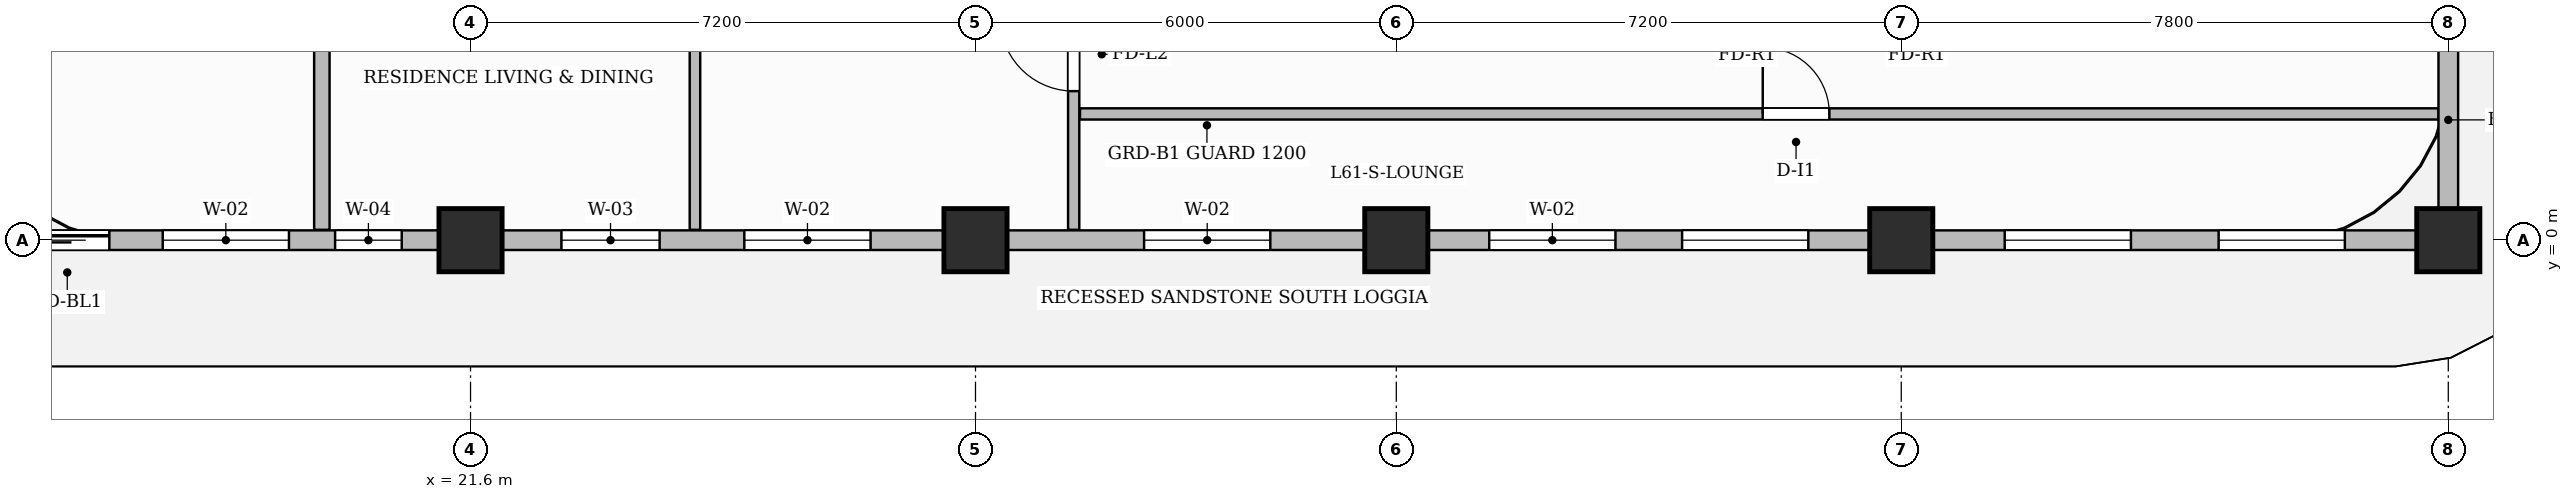
"""IFC4 building model, lengths in metres.
Left out: names, types, materials, properties, quantities, classifications, styles, units other than length and angle.
Written with IfcOpenShell. Run it as: python <this file> out.ifc"""

import sys

from ifc_helpers import new_model, si_unit, direction, frame, frame_2d, origin, origin_2d, place, context, subcontext, project, spatial, rectangle, extrude, source, transform, mapped, element, fill, save


model = new_model("IFC4")
c1 = context("Model", 3, precision=1e-05, world=origin(), true_north=direction((0.0, 1.0)))
c2 = subcontext(c1, "Body", "Model", "MODEL_VIEW")
j1 = project(units=[si_unit("LENGTHUNIT", "METRE"), si_unit("PLANEANGLEUNIT", "RADIAN")], contexts=[c1])
p1 = place(None, origin())
s1 = spatial("IfcSite", under=j1, at=p1, CompositionType="ELEMENT")
p2 = place(p1, origin())
s2 = spatial("IfcBuilding", under=s1, at=p2, CompositionType="ELEMENT")
p3 = place(p2, frame((0.0, 0.0, 244.25)))
s3 = spatial("IfcBuildingStorey", under=s2, at=p3, CompositionType="ELEMENT", Elevation=244.25)
m1 = source(origin(), c2, "Body", "SweptSolid", [
    extrude(rectangle(XDim=0.9, YDim=0.9, at=origin_2d()), origin(), (0.0, 0.0, 1.0), 3.85),
])
for number, where, z_axis, x_axis in (
    (1, (21.6, 0.0, 0.0), (0.0, 0.0, 1.0), (1.0, 0.0, 0.0)),
    (2, (28.8, 0.0, 0.0), (0.0, 0.0, 1.0), (1.0, 0.0, 0.0)),
    (3, (34.8, 0.0, 0.0), (0.0, 0.0, 1.0), (1.0, 0.0, 0.0)),
    (4, (42.0, 0.0, 0.0), (0.0, 0.0, 1.0), (1.0, 0.0, 0.0)),
    (5, (49.8, 0.0, 0.0), (0.0, 0.0, 1.0), (1.0, 0.0, 0.0)),
):
    element("IfcColumn", number, at=place(p3, frame(where, z_axis=z_axis, x_axis=x_axis)), inside=s3, PredefinedType="COLUMN", context=c2, shape_type="MappedRepresentation", body=[
        mapped(m1, transform((0.0, 0.0, 0.0), scale=1.0)),
    ])
p4 = place(p3, frame((30.2, 0.148, 0.0), z_axis=(0.0, 0.0, 1.0), x_axis=(0.0, 1.0, 0.0)))
e6 = element("IfcWall", 6, at=p4, inside=s3, PredefinedType="PARTITIONING", context=c2, shape_type="SweptSolid", body=[
    extrude(rectangle(XDim=9.312, YDim=0.16, at=frame_2d((4.656, 0.0))), origin(), (0.0, 0.0, 1.0), 3.6),
])
p5 = place(p4, frame((1.977, 0.0, 0.0)))
e7 = element("IfcOpeningElement", 7, at=p5, cuts=e6, PredefinedType="OPENING", context=c2, shape_type="SweptSolid", body=[
    extrude(rectangle(XDim=1.05, YDim=2.15, at=frame_2d((0.525, 1.075))), frame((0.0, 0.09, 0.0), z_axis=(0.0, -1.0, 0.0), x_axis=(1.0, 0.0, 0.0)), (0.0, 0.0, 1.0), 0.18),
])
p6 = place(p3, frame((30.29, 1.8, 0.0), z_axis=(0.0, 0.0, 1.0), x_axis=(1.0, 0.0, 0.0)))
e8 = element("IfcWall", 8, at=p6, inside=s3, PredefinedType="PARTITIONING", context=c2, shape_type="SweptSolid", body=[
    extrude(rectangle(XDim=19.37, YDim=0.16, at=frame_2d((9.685, 0.0))), origin(), (0.0, 0.0, 1.0), 3.6),
])
p7 = place(p6, frame((9.735, 0.0, 0.0)))
e9 = element("IfcOpeningElement", 9, at=p7, cuts=e8, PredefinedType="OPENING", context=c2, shape_type="SweptSolid", body=[
    extrude(rectangle(XDim=0.95, YDim=2.15, at=frame_2d((0.475, 1.075))), frame((0.0, 0.09, 0.0), z_axis=(0.0, -1.0, 0.0), x_axis=(1.0, 0.0, 0.0)), (0.0, 0.0, 1.0), 0.18),
])
p8 = place(p3, frame((19.48, 0.148, 0.0), z_axis=(0.0, 0.0, 1.0), x_axis=(0.0, 1.0, 0.0)))
e10 = element("IfcWall", 10, at=p8, inside=s3, PredefinedType="PARTITIONING", context=c2, shape_type="SweptSolid", body=[
    extrude(rectangle(XDim=9.312, YDim=0.22, at=frame_2d((4.656, 0.0))), origin(), (0.0, 0.0, 1.0), 3.6),
])
p9 = place(p3, frame((24.8, 0.148, 0.0), z_axis=(0.0, 0.0, 1.0), x_axis=(0.0, 1.0, 0.0)))
e11 = element("IfcWall", 11, at=p9, inside=s3, PredefinedType="PARTITIONING", context=c2, shape_type="SweptSolid", body=[
    extrude(rectangle(XDim=9.312, YDim=0.15, at=frame_2d((4.656, 0.0))), origin(), (0.0, 0.0, 1.0), 3.6),
])
p10 = place(p9, frame((7.877, 0.0, 0.0)))
e12 = element("IfcOpeningElement", 12, at=p10, cuts=e11, PredefinedType="OPENING", context=c2, shape_type="SweptSolid", body=[
    extrude(rectangle(XDim=0.9, YDim=2.15, at=frame_2d((0.45, 1.075))), frame((0.0, 0.085, 0.0), z_axis=(0.0, -1.0, 0.0), x_axis=(1.0, 0.0, 0.0)), (0.0, 0.0, 1.0), 0.17),
])
p11 = place(p3, frame((14.4, 0.0, 0.0), z_axis=(0.0, 0.0, 1.0), x_axis=(1.0, 0.0, 0.0)))
e13 = element("IfcWall", 13, at=p11, inside=s3, PredefinedType="SOLIDWALL", context=c2, shape_type="SweptSolid", body=[
    extrude(rectangle(XDim=35.4, YDim=0.28, at=frame_2d((17.7, 0.0))), origin(), (0.0, 0.0, 1.0), 3.135),
])
p12 = place(p11, frame((0.85, 0.0, 0.0)))
e14 = element("IfcOpeningElement", 14, at=p12, cuts=e13, PredefinedType="OPENING", context=c2, shape_type="SweptSolid", body=[
    extrude(rectangle(XDim=1.2, YDim=2.2, at=frame_2d((0.6, 1.1))), frame((0.0, 0.15, 0.0), z_axis=(0.0, -1.0, 0.0), x_axis=(1.0, 0.0, 0.0)), (0.0, 0.0, 1.0), 0.3),
])
p13 = place(p11, frame((2.811, 0.0, 0.8)))
e15 = element("IfcOpeningElement", 15, at=p13, cuts=e13, PredefinedType="OPENING", context=c2, shape_type="SweptSolid", body=[
    extrude(rectangle(XDim=1.8, YDim=1.85, at=frame_2d((0.9, 0.925))), frame((0.0, 0.15, 0.0), z_axis=(0.0, -1.0, 0.0), x_axis=(1.0, 0.0, 0.0)), (0.0, 0.0, 1.0), 0.3),
])
p14 = place(p11, frame((5.269, 0.0, 0.8)))
e16 = element("IfcOpeningElement", 16, at=p14, cuts=e13, PredefinedType="OPENING", context=c2, shape_type="SweptSolid", body=[
    extrude(rectangle(XDim=0.95, YDim=1.75, at=frame_2d((0.475, 0.875))), frame((0.0, 0.15, 0.0), z_axis=(0.0, -1.0, 0.0), x_axis=(1.0, 0.0, 0.0)), (0.0, 0.0, 1.0), 0.3),
])
p15 = place(p11, frame((8.496, 0.0, 0.8)))
e17 = element("IfcOpeningElement", 17, at=p15, cuts=e13, PredefinedType="OPENING", context=c2, shape_type="SweptSolid", body=[
    extrude(rectangle(XDim=1.4, YDim=1.85, at=frame_2d((0.7, 0.925))), frame((0.0, 0.15, 0.0), z_axis=(0.0, -1.0, 0.0), x_axis=(1.0, 0.0, 0.0)), (0.0, 0.0, 1.0), 0.3),
])
p16 = place(p11, frame((11.104, 0.0, 0.8)))
e18 = element("IfcOpeningElement", 18, at=p16, cuts=e13, PredefinedType="OPENING", context=c2, shape_type="SweptSolid", body=[
    extrude(rectangle(XDim=1.8, YDim=1.85, at=frame_2d((0.9, 0.925))), frame((0.0, 0.15, 0.0), z_axis=(0.0, -1.0, 0.0), x_axis=(1.0, 0.0, 0.0)), (0.0, 0.0, 1.0), 0.3),
])
p17 = place(p11, frame((16.804, 0.0, 0.8)))
e19 = element("IfcOpeningElement", 19, at=p17, cuts=e13, PredefinedType="OPENING", context=c2, shape_type="SweptSolid", body=[
    extrude(rectangle(XDim=1.8, YDim=1.85, at=frame_2d((0.9, 0.925))), frame((0.0, 0.15, 0.0), z_axis=(0.0, -1.0, 0.0), x_axis=(1.0, 0.0, 0.0)), (0.0, 0.0, 1.0), 0.3),
])
p18 = place(p11, frame((21.725, 0.0, 0.8)))
e20 = element("IfcOpeningElement", 20, at=p18, cuts=e13, PredefinedType="OPENING", context=c2, shape_type="SweptSolid", body=[
    extrude(rectangle(XDim=1.8, YDim=1.85, at=frame_2d((0.9, 0.925))), frame((0.0, 0.15, 0.0), z_axis=(0.0, -1.0, 0.0), x_axis=(1.0, 0.0, 0.0)), (0.0, 0.0, 1.0), 0.3),
])
p19 = place(p11, frame((24.475, 0.0, 0.8)))
e21 = element("IfcOpeningElement", 21, at=p19, cuts=e13, PredefinedType="OPENING", context=c2, shape_type="SweptSolid", body=[
    extrude(rectangle(XDim=1.8, YDim=1.85, at=frame_2d((0.9, 0.925))), frame((0.0, 0.15, 0.0), z_axis=(0.0, -1.0, 0.0), x_axis=(1.0, 0.0, 0.0)), (0.0, 0.0, 1.0), 0.3),
])
p20 = place(p11, frame((29.075, 0.0, 0.8)))
e22 = element("IfcOpeningElement", 22, at=p20, cuts=e13, PredefinedType="OPENING", context=c2, shape_type="SweptSolid", body=[
    extrude(rectangle(XDim=1.8, YDim=1.85, at=frame_2d((0.9, 0.925))), frame((0.0, 0.15, 0.0), z_axis=(0.0, -1.0, 0.0), x_axis=(1.0, 0.0, 0.0)), (0.0, 0.0, 1.0), 0.3),
])
p21 = place(p11, frame((32.125, 0.0, 0.8)))
e23 = element("IfcOpeningElement", 23, at=p21, cuts=e13, PredefinedType="OPENING", context=c2, shape_type="SweptSolid", body=[
    extrude(rectangle(XDim=1.8, YDim=1.85, at=frame_2d((0.9, 0.925))), frame((0.0, 0.15, 0.0), z_axis=(0.0, -1.0, 0.0), x_axis=(1.0, 0.0, 0.0)), (0.0, 0.0, 1.0), 0.3),
])
p22 = place(p3, frame((49.8, 0.05, 0.0), z_axis=(0.0, 0.0, 1.0), x_axis=(0.0, 1.0, 0.0)))
e24 = element("IfcWall", 24, at=p22, inside=s3, PredefinedType="SOLIDWALL", context=c2, shape_type="SweptSolid", body=[
    extrude(rectangle(XDim=3.33, YDim=0.28, at=frame_2d((1.665, 0.0))), origin(), (0.0, 0.0, 1.0), 3.6),
])
m2 = source(origin(), c2, "Body", "SweptSolid", [
    extrude(rectangle(XDim=1.05, YDim=2.15, at=frame_2d((0.525, 1.075))), frame((0.0, 0.025, 0.0), z_axis=(0.0, -1.0, 0.0), x_axis=(1.0, 0.0, 0.0)), (0.0, 0.0, 1.0), 0.05),
])
p23 = place(p5, origin())
e25 = element("IfcDoor", 25, at=p23, inside=s3, OperationType="SINGLE_SWING_RIGHT", PredefinedType="DOOR", context=c2, shape_type="MappedRepresentation", body=[
    mapped(m2, transform((0.0, 0.0, 0.0), scale=1.0)),
])
fill(e7, e25)
m3 = source(origin(), c2, "Body", "SweptSolid", [
    extrude(rectangle(XDim=0.95, YDim=2.15, at=frame_2d((0.475, 1.075))), frame((0.0, 0.025, 0.0), z_axis=(0.0, -1.0, 0.0), x_axis=(1.0, 0.0, 0.0)), (0.0, 0.0, 1.0), 0.05),
])
p24 = place(p7, origin())
e26 = element("IfcDoor", 26, at=p24, inside=s3, OperationType="SINGLE_SWING_LEFT", PredefinedType="DOOR", context=c2, shape_type="MappedRepresentation", body=[
    mapped(m3, transform((0.0, 0.0, 0.0), scale=1.0)),
])
fill(e9, e26)
m4 = source(origin(), c2, "Body", "SweptSolid", [
    extrude(rectangle(XDim=1.2, YDim=2.2, at=frame_2d((0.6, 1.1))), frame((0.0, 0.025, 0.0), z_axis=(0.0, -1.0, 0.0), x_axis=(1.0, 0.0, 0.0)), (0.0, 0.0, 1.0), 0.05),
])
p25 = place(p12, origin())
e27 = element("IfcDoor", 27, at=p25, inside=s3, OperationType="SLIDING_TO_LEFT", PredefinedType="DOOR", context=c2, shape_type="MappedRepresentation", body=[
    mapped(m4, transform((0.0, 0.0, 0.0), scale=1.0)),
])
fill(e14, e27)
m5 = source(origin(), c2, "Body", "SweptSolid", [
    extrude(rectangle(XDim=1.8, YDim=1.85, at=frame_2d((0.9, 0.925))), frame((0.0, 0.03, 0.0), z_axis=(0.0, -1.0, 0.0), x_axis=(1.0, 0.0, 0.0)), (0.0, 0.0, 1.0), 0.06),
])
p26 = place(p13, origin())
e28 = element("IfcWindow", 28, at=p26, inside=s3, PartitioningType="DOUBLE_PANEL_VERTICAL", PredefinedType="WINDOW", context=c2, shape_type="MappedRepresentation", body=[
    mapped(m5, transform((0.0, 0.0, 0.0), scale=1.0)),
])
fill(e15, e28)
m6 = source(origin(), c2, "Body", "SweptSolid", [
    extrude(rectangle(XDim=0.95, YDim=1.75, at=frame_2d((0.475, 0.875))), frame((0.0, 0.03, 0.0), z_axis=(0.0, -1.0, 0.0), x_axis=(1.0, 0.0, 0.0)), (0.0, 0.0, 1.0), 0.06),
])
p27 = place(p14, origin())
e29 = element("IfcWindow", 29, at=p27, inside=s3, PartitioningType="SINGLE_PANEL", PredefinedType="WINDOW", context=c2, shape_type="MappedRepresentation", body=[
    mapped(m6, transform((0.0, 0.0, 0.0), scale=1.0)),
])
fill(e16, e29)
m7 = source(origin(), c2, "Body", "SweptSolid", [
    extrude(rectangle(XDim=1.4, YDim=1.85, at=frame_2d((0.7, 0.925))), frame((0.0, 0.03, 0.0), z_axis=(0.0, -1.0, 0.0), x_axis=(1.0, 0.0, 0.0)), (0.0, 0.0, 1.0), 0.06),
])
p28 = place(p15, origin())
e30 = element("IfcWindow", 30, at=p28, inside=s3, PartitioningType="SINGLE_PANEL", PredefinedType="WINDOW", context=c2, shape_type="MappedRepresentation", body=[
    mapped(m7, transform((0.0, 0.0, 0.0), scale=1.0)),
])
fill(e17, e30)
p29 = place(p16, origin())
e31 = element("IfcWindow", 31, at=p29, inside=s3, PartitioningType="DOUBLE_PANEL_VERTICAL", PredefinedType="WINDOW", context=c2, shape_type="MappedRepresentation", body=[
    mapped(m5, transform((0.0, 0.0, 0.0), scale=1.0)),
])
fill(e18, e31)
p30 = place(p17, origin())
e32 = element("IfcWindow", 32, at=p30, inside=s3, PartitioningType="DOUBLE_PANEL_VERTICAL", PredefinedType="WINDOW", context=c2, shape_type="MappedRepresentation", body=[
    mapped(m5, transform((0.0, 0.0, 0.0), scale=1.0)),
])
fill(e19, e32)
p31 = place(p18, origin())
e33 = element("IfcWindow", 33, at=p31, inside=s3, PartitioningType="DOUBLE_PANEL_VERTICAL", PredefinedType="WINDOW", context=c2, shape_type="MappedRepresentation", body=[
    mapped(m5, transform((0.0, 0.0, 0.0), scale=1.0)),
])
fill(e20, e33)
p32 = place(p19, origin())
e34 = element("IfcWindow", 34, at=p32, inside=s3, PartitioningType="DOUBLE_PANEL_VERTICAL", PredefinedType="WINDOW", context=c2, shape_type="MappedRepresentation", body=[
    mapped(m5, transform((0.0, 0.0, 0.0), scale=1.0)),
])
fill(e21, e34)
p33 = place(p20, origin())
e35 = element("IfcWindow", 35, at=p33, inside=s3, PartitioningType="DOUBLE_PANEL_VERTICAL", PredefinedType="WINDOW", context=c2, shape_type="MappedRepresentation", body=[
    mapped(m5, transform((0.0, 0.0, 0.0), scale=1.0)),
])
fill(e22, e35)
p34 = place(p21, origin())
e36 = element("IfcWindow", 36, at=p34, inside=s3, PartitioningType="DOUBLE_PANEL_VERTICAL", PredefinedType="WINDOW", context=c2, shape_type="MappedRepresentation", body=[
    mapped(m5, transform((0.0, 0.0, 0.0), scale=1.0)),
])
fill(e23, e36)
save(model, sys.argv[1])
